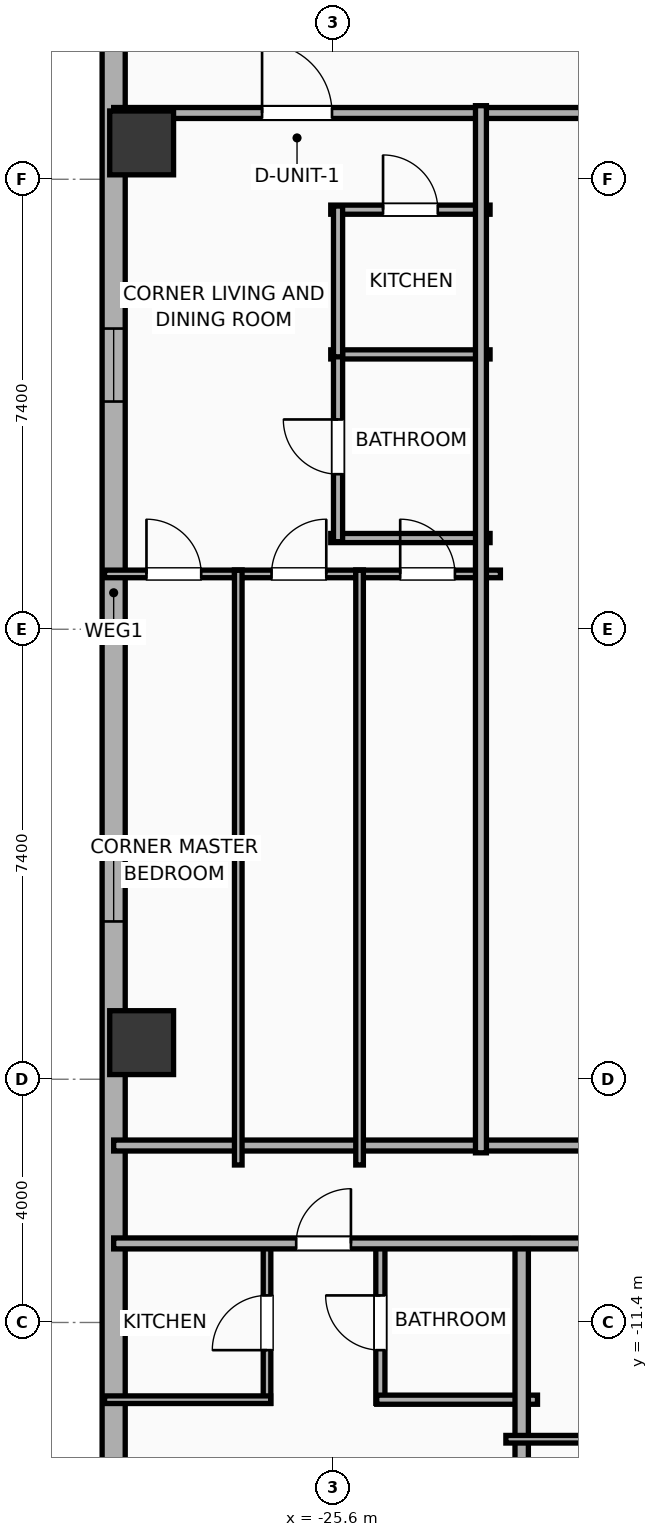
"""IFC4 building model, lengths in metres.
Left out: names, types, materials, properties, quantities, classifications, styles, units other than length and angle.
Written with IfcOpenShell. Run it as: python <this file> out.ifc"""

import sys

from ifc_helpers import new_model, si_unit, direction, frame, frame_2d, origin, origin_2d, place, context, subcontext, project, spatial, rectangle, hollow_rectangle, extrude, element, fill, save


model = new_model("IFC4")
c1 = context("Model", 3, precision=1e-05, world=origin(), true_north=direction((0.0, 1.0)))
c2 = subcontext(c1, "Body", "Model", "MODEL_VIEW")
j1 = project(units=[si_unit("LENGTHUNIT", "METRE"), si_unit("PLANEANGLEUNIT", "RADIAN")], contexts=[c1])
p1 = place(None, origin())
s1 = spatial("IfcSite", under=j1, at=p1, CompositionType="ELEMENT")
p2 = place(p1, origin())
s2 = spatial("IfcBuilding", under=s1, at=p2, CompositionType="ELEMENT")
p3 = place(p2, frame((0.0, 0.0, 136.5)))
s3 = spatial("IfcBuildingStorey", under=s2, at=p3, CompositionType="ELEMENT", Elevation=136.5)
for number, where, z_axis, x_axis in (
    (1, (-28.75, 7.998, 0.0), (0.0, 0.0, 1.0), (1.0, 0.0, 0.0)),
    (2, (-28.75, -6.798, 0.0), (0.0, 0.0, 1.0), (1.0, 0.0, 0.0)),
):
    element("IfcColumn", number, at=place(p3, frame(where, z_axis=z_axis, x_axis=x_axis)), inside=s3, PredefinedType="COLUMN", context=c2, shape_type="SweptSolid", body=[
        extrude(hollow_rectangle(XDim=1.05, YDim=1.05, WallThickness=0.036, at=origin_2d()), origin(), (0.0, 0.0, 1.0), 3.865),
    ])
p4 = place(p3, frame((-29.21, -16.581, 0.0), z_axis=(0.0, 0.0, 1.0), x_axis=(0.0, 1.0, 0.0)))
e3 = element("IfcWall", 3, at=p4, inside=s3, PredefinedType="ELEMENTEDWALL", context=c2, shape_type="SweptSolid", body=[
    extrude(rectangle(XDim=34.363, YDim=0.38, at=frame_2d((17.181, 0.0))), origin(), (0.0, 0.0, 1.0), 2.39),
])
p5 = place(p4, frame((30.757, 0.0, 0.55)))
e4 = element("IfcOpeningElement", 4, at=p5, cuts=e3, PredefinedType="OPENING", context=c2, shape_type="SweptSolid", body=[
    extrude(rectangle(XDim=1.2, YDim=1.15, at=frame_2d((0.6, 0.575))), frame((0.0, 0.2, 0.0), z_axis=(0.0, -1.0, 0.0), x_axis=(1.0, 0.0, 0.0)), (0.0, 0.0, 1.0), 0.4),
])
p6 = place(p4, frame((20.326, 0.0, 0.55)))
e5 = element("IfcOpeningElement", 5, at=p6, cuts=e3, PredefinedType="OPENING", context=c2, shape_type="SweptSolid", body=[
    extrude(rectangle(XDim=1.2, YDim=1.15, at=frame_2d((0.6, 0.575))), frame((0.0, 0.2, 0.0), z_axis=(0.0, -1.0, 0.0), x_axis=(1.0, 0.0, 0.0)), (0.0, 0.0, 1.0), 0.4),
])
p7 = place(p4, frame((11.776, 0.0, 0.55)))
e6 = element("IfcOpeningElement", 6, at=p7, cuts=e3, PredefinedType="OPENING", context=c2, shape_type="SweptSolid", body=[
    extrude(rectangle(XDim=1.2, YDim=1.15, at=frame_2d((0.6, 0.575))), frame((0.0, 0.2, 0.0), z_axis=(0.0, -1.0, 0.0), x_axis=(1.0, 0.0, 0.0)), (0.0, 0.0, 1.0), 0.4),
])
p8 = place(p3, frame((-29.21, 8.49, 0.0), z_axis=(0.0, 0.0, 1.0), x_axis=(1.0, 0.0, 0.0)))
e7 = element("IfcWall", 7, at=p8, inside=s3, PredefinedType="PARTITIONING", context=c2, shape_type="SweptSolid", body=[
    extrude(rectangle(XDim=19.33, YDim=0.18, at=frame_2d((9.665, 0.0))), origin(), (0.0, 0.0, 1.0), 2.39),
])
p9 = place(p8, frame((2.44, 0.0, 0.0)))
e8 = element("IfcOpeningElement", 8, at=p9, cuts=e7, PredefinedType="OPENING", context=c2, shape_type="SweptSolid", body=[
    extrude(rectangle(XDim=1.15, YDim=2.05, at=frame_2d((0.575, 1.025))), frame((0.0, 0.1, 0.0), z_axis=(0.0, -1.0, 0.0), x_axis=(1.0, 0.0, 0.0)), (0.0, 0.0, 1.0), 0.2),
])
p10 = place(p3, frame((-29.21, -8.49, 0.0), z_axis=(0.0, 0.0, 1.0), x_axis=(1.0, 0.0, 0.0)))
e9 = element("IfcWall", 9, at=p10, inside=s3, PredefinedType="PARTITIONING", context=c2, shape_type="SweptSolid", body=[
    extrude(rectangle(XDim=19.33, YDim=0.18, at=frame_2d((9.665, 0.0))), origin(), (0.0, 0.0, 1.0), 2.39),
])
p11 = place(p3, frame((-26.688, -12.73, 0.0), z_axis=(0.0, 0.0, 1.0), x_axis=(0.0, 1.0, 0.0)))
e10 = element("IfcWall", 10, at=p11, inside=s3, PredefinedType="PARTITIONING", context=c2, shape_type="SweptSolid", body=[
    extrude(rectangle(XDim=2.65, YDim=0.125, at=frame_2d((1.325, 0.0))), origin(), (0.0, 0.0, 1.0), 3.5),
])
p12 = place(p11, frame((0.875, 0.0, 0.0)))
e11 = element("IfcOpeningElement", 11, at=p12, cuts=e10, PredefinedType="OPENING", context=c2, shape_type="SweptSolid", body=[
    extrude(rectangle(XDim=0.9, YDim=2.05, at=frame_2d((0.45, 1.025))), frame((0.0, 0.073, 0.0), z_axis=(0.0, -1.0, 0.0), x_axis=(1.0, 0.0, 0.0)), (0.0, 0.0, 1.0), 0.145),
])
p13 = place(p3, frame((-24.824, -12.73, 0.0), z_axis=(0.0, 0.0, 1.0), x_axis=(0.0, 1.0, 0.0)))
e12 = element("IfcWall", 12, at=p13, inside=s3, PredefinedType="PLUMBINGWALL", context=c2, shape_type="SweptSolid", body=[
    extrude(rectangle(XDim=2.65, YDim=0.15, at=frame_2d((1.325, 0.0))), origin(), (0.0, 0.0, 1.0), 3.5),
])
p14 = place(p13, frame((0.875, 0.0, 0.0)))
e13 = element("IfcOpeningElement", 13, at=p14, cuts=e12, PredefinedType="OPENING", context=c2, shape_type="SweptSolid", body=[
    extrude(rectangle(XDim=0.9, YDim=2.05, at=frame_2d((0.45, 1.025))), frame((0.0, 0.085, 0.0), z_axis=(0.0, -1.0, 0.0), x_axis=(1.0, 0.0, 0.0)), (0.0, 0.0, 1.0), 0.17),
])
p15 = place(p3, frame((-29.36, -12.67, 0.0), z_axis=(0.0, 0.0, 1.0), x_axis=(1.0, 0.0, 0.0)))
e14 = element("IfcWall", 14, at=p15, inside=s3, PredefinedType="PARTITIONING", context=c2, shape_type="SweptSolid", body=[
    extrude(rectangle(XDim=2.732, YDim=0.125, at=frame_2d((1.366, 0.0))), origin(), (0.0, 0.0, 1.0), 3.5),
])
p16 = place(p3, frame((-24.884, -12.67, 0.0), z_axis=(0.0, 0.0, 1.0), x_axis=(1.0, 0.0, 0.0)))
e15 = element("IfcWall", 15, at=p16, inside=s3, PredefinedType="PLUMBINGWALL", context=c2, shape_type="SweptSolid", body=[
    extrude(rectangle(XDim=2.644, YDim=0.15, at=frame_2d((1.322, 0.0))), origin(), (0.0, 0.0, 1.0), 3.5),
])
p17 = place(p3, frame((-22.5, -20.41, 0.0), z_axis=(0.0, 0.0, 1.0), x_axis=(0.0, 1.0, 0.0)))
e16 = element("IfcWall", 16, at=p17, inside=s3, PredefinedType="PARTITIONING", context=c2, shape_type="SweptSolid", body=[
    extrude(rectangle(XDim=10.39, YDim=0.22, at=frame_2d((5.195, 0.0))), origin(), (0.0, 0.0, 1.0), 3.5),
])
p18 = place(p3, frame((-22.76, -13.32, 0.0), z_axis=(0.0, 0.0, 1.0), x_axis=(1.0, 0.0, 0.0)))
e17 = element("IfcWall", 17, at=p18, inside=s3, PredefinedType="PARTITIONING", context=c2, shape_type="SweptSolid", body=[
    extrude(rectangle(XDim=2.69, YDim=0.125, at=frame_2d((1.345, 0.0))), origin(), (0.0, 0.0, 1.0), 3.5),
])
p19 = place(p3, frame((-29.21, -10.1, 0.0), z_axis=(0.0, 0.0, 1.0), x_axis=(1.0, 0.0, 0.0)))
e18 = element("IfcWall", 18, at=p19, inside=s3, PredefinedType="PARTITIONING", context=c2, shape_type="SweptSolid", body=[
    extrude(rectangle(XDim=62.42, YDim=0.18, at=frame_2d((31.21, 0.0))), origin(), (0.0, 0.0, 1.0), 2.39),
])
p20 = place(p19, frame((3.002, 0.0, 0.0)))
e19 = element("IfcOpeningElement", 19, at=p20, cuts=e18, PredefinedType="OPENING", context=c2, shape_type="SweptSolid", body=[
    extrude(rectangle(XDim=0.9, YDim=2.05, at=frame_2d((0.45, 1.025))), frame((0.0, 0.1, 0.0), z_axis=(0.0, -1.0, 0.0), x_axis=(1.0, 0.0, 0.0)), (0.0, 0.0, 1.0), 0.2),
])
p21 = place(p19, frame((10.049, 0.0, 0.0)))
e20 = element("IfcOpeningElement", 20, at=p21, cuts=e18, PredefinedType="OPENING", context=c2, shape_type="SweptSolid", body=[
    extrude(rectangle(XDim=1.15, YDim=2.05, at=frame_2d((0.575, 1.025))), frame((0.0, 0.1, 0.0), z_axis=(0.0, -1.0, 0.0), x_axis=(1.0, 0.0, 0.0)), (0.0, 0.0, 1.0), 0.2),
])
p22 = place(p19, frame((17.552, 0.0, 0.0)))
e21 = element("IfcOpeningElement", 21, at=p22, cuts=e18, PredefinedType="OPENING", context=c2, shape_type="SweptSolid", body=[
    extrude(rectangle(XDim=1.15, YDim=2.05, at=frame_2d((0.575, 1.025))), frame((0.0, 0.1, 0.0), z_axis=(0.0, -1.0, 0.0), x_axis=(1.0, 0.0, 0.0)), (0.0, 0.0, 1.0), 0.2),
])
p23 = place(p19, frame((25.048, 0.0, 0.0)))
e22 = element("IfcOpeningElement", 22, at=p23, cuts=e18, PredefinedType="OPENING", context=c2, shape_type="SweptSolid", body=[
    extrude(rectangle(XDim=1.15, YDim=2.05, at=frame_2d((0.575, 1.025))), frame((0.0, 0.1, 0.0), z_axis=(0.0, -1.0, 0.0), x_axis=(1.0, 0.0, 0.0)), (0.0, 0.0, 1.0), 0.2),
])
p24 = place(p19, frame((32.551, 0.0, 0.0)))
e23 = element("IfcOpeningElement", 23, at=p24, cuts=e18, PredefinedType="OPENING", context=c2, shape_type="SweptSolid", body=[
    extrude(rectangle(XDim=1.15, YDim=2.05, at=frame_2d((0.575, 1.025))), frame((0.0, 0.1, 0.0), z_axis=(0.0, -1.0, 0.0), x_axis=(1.0, 0.0, 0.0)), (0.0, 0.0, 1.0), 0.2),
])
p25 = place(p19, frame((40.048, 0.0, 0.0)))
e24 = element("IfcOpeningElement", 24, at=p25, cuts=e18, PredefinedType="OPENING", context=c2, shape_type="SweptSolid", body=[
    extrude(rectangle(XDim=1.15, YDim=2.05, at=frame_2d((0.575, 1.025))), frame((0.0, 0.1, 0.0), z_axis=(0.0, -1.0, 0.0), x_axis=(1.0, 0.0, 0.0)), (0.0, 0.0, 1.0), 0.2),
])
p26 = place(p19, frame((47.551, 0.0, 0.0)))
e25 = element("IfcOpeningElement", 25, at=p26, cuts=e18, PredefinedType="OPENING", context=c2, shape_type="SweptSolid", body=[
    extrude(rectangle(XDim=1.15, YDim=2.05, at=frame_2d((0.575, 1.025))), frame((0.0, 0.1, 0.0), z_axis=(0.0, -1.0, 0.0), x_axis=(1.0, 0.0, 0.0)), (0.0, 0.0, 1.0), 0.2),
])
p27 = place(p19, frame((57.064, 0.0, 0.0)))
e26 = element("IfcOpeningElement", 26, at=p27, cuts=e18, PredefinedType="OPENING", context=c2, shape_type="SweptSolid", body=[
    extrude(rectangle(XDim=1.15, YDim=2.05, at=frame_2d((0.575, 1.025))), frame((0.0, 0.1, 0.0), z_axis=(0.0, -1.0, 0.0), x_axis=(1.0, 0.0, 0.0)), (0.0, 0.0, 1.0), 0.2),
])
p28 = place(p3, frame((-25.64, 6.9, 0.0), z_axis=(0.0, 0.0, 1.0), x_axis=(1.0, 0.0, 0.0)))
e27 = element("IfcWall", 27, at=p28, inside=s3, PredefinedType="PLUMBINGWALL", context=c2, shape_type="SweptSolid", body=[
    extrude(rectangle(XDim=2.62, YDim=0.15, at=frame_2d((1.31, 0.0))), origin(), (0.0, 0.0, 1.0), 3.5),
])
p29 = place(p28, frame((0.86, 0.0, 0.0)))
e28 = element("IfcOpeningElement", 28, at=p29, cuts=e27, PredefinedType="OPENING", context=c2, shape_type="SweptSolid", body=[
    extrude(rectangle(XDim=0.9, YDim=2.05, at=frame_2d((0.45, 1.025))), frame((0.0, 0.085, 0.0), z_axis=(0.0, -1.0, 0.0), x_axis=(1.0, 0.0, 0.0)), (0.0, 0.0, 1.0), 0.17),
])
for number, where, z_axis, x_axis in (
    (29, (-25.64, 4.52, 0.0), (0.0, 0.0, 1.0), (1.0, 0.0, 0.0)),
    (30, (-25.64, 1.5, 0.0), (0.0, 0.0, 1.0), (1.0, 0.0, 0.0)),
):
    element("IfcWall", number, at=place(p3, frame(where, z_axis=z_axis, x_axis=x_axis)), inside=s3, PredefinedType="PLUMBINGWALL", context=c2, shape_type="SweptSolid", body=[
        extrude(rectangle(XDim=2.62, YDim=0.15, at=frame_2d((1.31, 0.0))), origin(), (0.0, 0.0, 1.0), 3.5),
    ])
p30 = place(p3, frame((-25.52, 1.44, 0.0), z_axis=(0.0, 0.0, 1.0), x_axis=(0.0, 1.0, 0.0)))
e31 = element("IfcWall", 31, at=p30, inside=s3, PredefinedType="PLUMBINGWALL", context=c2, shape_type="SweptSolid", body=[
    extrude(rectangle(XDim=3.12, YDim=0.15, at=frame_2d((1.56, 0.0))), origin(), (0.0, 0.0, 1.0), 3.5),
])
p31 = place(p30, frame((1.11, 0.0, 0.0)))
e32 = element("IfcOpeningElement", 32, at=p31, cuts=e31, PredefinedType="OPENING", context=c2, shape_type="SweptSolid", body=[
    extrude(rectangle(XDim=0.9, YDim=2.05, at=frame_2d((0.45, 1.025))), frame((0.0, 0.085, 0.0), z_axis=(0.0, -1.0, 0.0), x_axis=(1.0, 0.0, 0.0)), (0.0, 0.0, 1.0), 0.17),
])
p32 = place(p3, frame((-25.52, 4.48, 0.0), z_axis=(0.0, 0.0, 1.0), x_axis=(0.0, 1.0, 0.0)))
e33 = element("IfcWall", 33, at=p32, inside=s3, PredefinedType="PLUMBINGWALL", context=c2, shape_type="SweptSolid", body=[
    extrude(rectangle(XDim=2.48, YDim=0.15, at=frame_2d((1.24, 0.0))), origin(), (0.0, 0.0, 1.0), 3.5),
])
p33 = place(p3, frame((-29.36, 0.91, 0.0), z_axis=(0.0, 0.0, 1.0), x_axis=(1.0, 0.0, 0.0)))
e34 = element("IfcWall", 34, at=p33, inside=s3, PredefinedType="PARTITIONING", context=c2, shape_type="SweptSolid", body=[
    extrude(rectangle(XDim=2.262, YDim=0.125, at=frame_2d((1.131, 0.0))), origin(), (0.0, 0.0, 1.0), 3.5),
])
p34 = place(p33, frame((0.689, 0.0, 0.0)))
e35 = element("IfcOpeningElement", 35, at=p34, cuts=e34, PredefinedType="OPENING", context=c2, shape_type="SweptSolid", body=[
    extrude(rectangle(XDim=0.9, YDim=2.05, at=frame_2d((0.45, 1.025))), frame((0.0, 0.073, 0.0), z_axis=(0.0, -1.0, 0.0), x_axis=(1.0, 0.0, 0.0)), (0.0, 0.0, 1.0), 0.145),
])
p35 = place(p3, frame((-27.223, 0.91, 0.0), z_axis=(0.0, 0.0, 1.0), x_axis=(1.0, 0.0, 0.0)))
e36 = element("IfcWall", 36, at=p35, inside=s3, PredefinedType="PARTITIONING", context=c2, shape_type="SweptSolid", body=[
    extrude(rectangle(XDim=2.12, YDim=0.125, at=frame_2d((1.06, 0.0))), origin(), (0.0, 0.0, 1.0), 3.5),
])
p36 = place(p35, frame((0.61, 0.0, 0.0)))
e37 = element("IfcOpeningElement", 37, at=p36, cuts=e36, PredefinedType="OPENING", context=c2, shape_type="SweptSolid", body=[
    extrude(rectangle(XDim=0.9, YDim=2.05, at=frame_2d((0.45, 1.025))), frame((0.0, 0.073, 0.0), z_axis=(0.0, -1.0, 0.0), x_axis=(1.0, 0.0, 0.0)), (0.0, 0.0, 1.0), 0.145),
])
p37 = place(p3, frame((-25.229, 0.91, 0.0), z_axis=(0.0, 0.0, 1.0), x_axis=(1.0, 0.0, 0.0)))
e38 = element("IfcWall", 38, at=p37, inside=s3, PredefinedType="PARTITIONING", context=c2, shape_type="SweptSolid", body=[
    extrude(rectangle(XDim=2.378, YDim=0.125, at=frame_2d((1.189, 0.0))), origin(), (0.0, 0.0, 1.0), 3.5),
])
p38 = place(p37, frame((0.73, 0.0, 0.0)))
e39 = element("IfcOpeningElement", 39, at=p38, cuts=e38, PredefinedType="OPENING", context=c2, shape_type="SweptSolid", body=[
    extrude(rectangle(XDim=0.9, YDim=2.05, at=frame_2d((0.45, 1.025))), frame((0.0, 0.073, 0.0), z_axis=(0.0, -1.0, 0.0), x_axis=(1.0, 0.0, 0.0)), (0.0, 0.0, 1.0), 0.145),
])
for number, where, z_axis, x_axis in (
    (40, (-25.166, -8.81, 0.0), (0.0, 0.0, 1.0), (0.0, 1.0, 0.0)),
    (41, (-27.161, -8.81, 0.0), (0.0, 0.0, 1.0), (0.0, 1.0, 0.0)),
):
    element("IfcWall", number, at=place(p3, frame(where, z_axis=z_axis, x_axis=x_axis)), inside=s3, PredefinedType="PARTITIONING", context=c2, shape_type="SweptSolid", body=[
        extrude(rectangle(XDim=9.78, YDim=0.125, at=frame_2d((4.89, 0.0))), origin(), (0.0, 0.0, 1.0), 3.5),
    ])
p39 = place(p3, frame((-23.17, -8.61, 0.0), z_axis=(0.0, 0.0, 1.0), x_axis=(0.0, 1.0, 0.0)))
e42 = element("IfcWall", 42, at=p39, inside=s3, PredefinedType="PARTITIONING", context=c2, shape_type="SweptSolid", body=[
    extrude(rectangle(XDim=17.22, YDim=0.18, at=frame_2d((8.61, 0.0))), origin(), (0.0, 0.0, 1.0), 3.5),
])
p40 = place(p6, origin())
e43 = element("IfcWindow", 43, at=p40, inside=s3, PartitioningType="SINGLE_PANEL", PredefinedType="WINDOW", context=c2, shape_type="SweptSolid", body=[
    extrude(rectangle(XDim=1.2, YDim=1.15, at=frame_2d((0.6, 0.575))), frame((0.0, 0.03, 0.0), z_axis=(0.0, -1.0, 0.0), x_axis=(1.0, 0.0, 0.0)), (0.0, 0.0, 1.0), 0.06),
])
fill(e5, e43)
p41 = place(p7, origin())
e44 = element("IfcWindow", 44, at=p41, inside=s3, PartitioningType="SINGLE_PANEL", PredefinedType="WINDOW", context=c2, shape_type="SweptSolid", body=[
    extrude(rectangle(XDim=1.2, YDim=1.15, at=frame_2d((0.6, 0.575))), frame((0.0, 0.03, 0.0), z_axis=(0.0, -1.0, 0.0), x_axis=(1.0, 0.0, 0.0)), (0.0, 0.0, 1.0), 0.06),
])
fill(e6, e44)
p42 = place(p9, origin())
e45 = element("IfcDoor", 45, at=p42, inside=s3, OperationType="SINGLE_SWING_LEFT", PredefinedType="DOOR", context=c2, shape_type="SweptSolid", body=[
    extrude(rectangle(XDim=1.15, YDim=2.05, at=frame_2d((0.575, 1.025))), frame((0.0, 0.025, 0.0), z_axis=(0.0, -1.0, 0.0), x_axis=(1.0, 0.0, 0.0)), (0.0, 0.0, 1.0), 0.05),
])
fill(e8, e45)
p43 = place(p12, origin())
e46 = element("IfcDoor", 46, at=p43, inside=s3, OperationType="SINGLE_SWING_LEFT", PredefinedType="DOOR", context=c2, shape_type="SweptSolid", body=[
    extrude(rectangle(XDim=0.9, YDim=2.05, at=frame_2d((0.45, 1.025))), frame((0.0, 0.025, 0.0), z_axis=(0.0, -1.0, 0.0), x_axis=(1.0, 0.0, 0.0)), (0.0, 0.0, 1.0), 0.05),
])
fill(e11, e46)
p44 = place(p14, origin())
e47 = element("IfcDoor", 47, at=p44, inside=s3, OperationType="SINGLE_SWING_RIGHT", PredefinedType="DOOR", context=c2, shape_type="SweptSolid", body=[
    extrude(rectangle(XDim=0.9, YDim=2.05, at=frame_2d((0.45, 1.025))), frame((0.0, 0.025, 0.0), z_axis=(0.0, -1.0, 0.0), x_axis=(1.0, 0.0, 0.0)), (0.0, 0.0, 1.0), 0.05),
])
fill(e13, e47)
p45 = place(p20, origin())
e48 = element("IfcDoor", 48, at=p45, inside=s3, OperationType="SINGLE_SWING_RIGHT", PredefinedType="DOOR", context=c2, shape_type="SweptSolid", body=[
    extrude(rectangle(XDim=0.9, YDim=2.05, at=frame_2d((0.45, 1.025))), frame((0.0, 0.025, 0.0), z_axis=(0.0, -1.0, 0.0), x_axis=(1.0, 0.0, 0.0)), (0.0, 0.0, 1.0), 0.05),
])
fill(e19, e48)
p46 = place(p29, origin())
e49 = element("IfcDoor", 49, at=p46, inside=s3, OperationType="SINGLE_SWING_LEFT", PredefinedType="DOOR", context=c2, shape_type="SweptSolid", body=[
    extrude(rectangle(XDim=0.9, YDim=2.05, at=frame_2d((0.45, 1.025))), frame((0.0, 0.025, 0.0), z_axis=(0.0, -1.0, 0.0), x_axis=(1.0, 0.0, 0.0)), (0.0, 0.0, 1.0), 0.05),
])
fill(e28, e49)
p47 = place(p31, origin())
e50 = element("IfcDoor", 50, at=p47, inside=s3, OperationType="SINGLE_SWING_RIGHT", PredefinedType="DOOR", context=c2, shape_type="SweptSolid", body=[
    extrude(rectangle(XDim=0.9, YDim=2.05, at=frame_2d((0.45, 1.025))), frame((0.0, 0.025, 0.0), z_axis=(0.0, -1.0, 0.0), x_axis=(1.0, 0.0, 0.0)), (0.0, 0.0, 1.0), 0.05),
])
fill(e32, e50)
p48 = place(p34, origin())
e51 = element("IfcDoor", 51, at=p48, inside=s3, OperationType="SINGLE_SWING_LEFT", PredefinedType="DOOR", context=c2, shape_type="SweptSolid", body=[
    extrude(rectangle(XDim=0.9, YDim=2.05, at=frame_2d((0.45, 1.025))), frame((0.0, 0.025, 0.0), z_axis=(0.0, -1.0, 0.0), x_axis=(1.0, 0.0, 0.0)), (0.0, 0.0, 1.0), 0.05),
])
fill(e35, e51)
p49 = place(p36, origin())
e52 = element("IfcDoor", 52, at=p49, inside=s3, OperationType="SINGLE_SWING_RIGHT", PredefinedType="DOOR", context=c2, shape_type="SweptSolid", body=[
    extrude(rectangle(XDim=0.9, YDim=2.05, at=frame_2d((0.45, 1.025))), frame((0.0, 0.025, 0.0), z_axis=(0.0, -1.0, 0.0), x_axis=(1.0, 0.0, 0.0)), (0.0, 0.0, 1.0), 0.05),
])
fill(e37, e52)
p50 = place(p38, origin())
e53 = element("IfcDoor", 53, at=p50, inside=s3, OperationType="SINGLE_SWING_LEFT", PredefinedType="DOOR", context=c2, shape_type="SweptSolid", body=[
    extrude(rectangle(XDim=0.9, YDim=2.05, at=frame_2d((0.45, 1.025))), frame((0.0, 0.025, 0.0), z_axis=(0.0, -1.0, 0.0), x_axis=(1.0, 0.0, 0.0)), (0.0, 0.0, 1.0), 0.05),
])
fill(e39, e53)
save(model, sys.argv[1])
